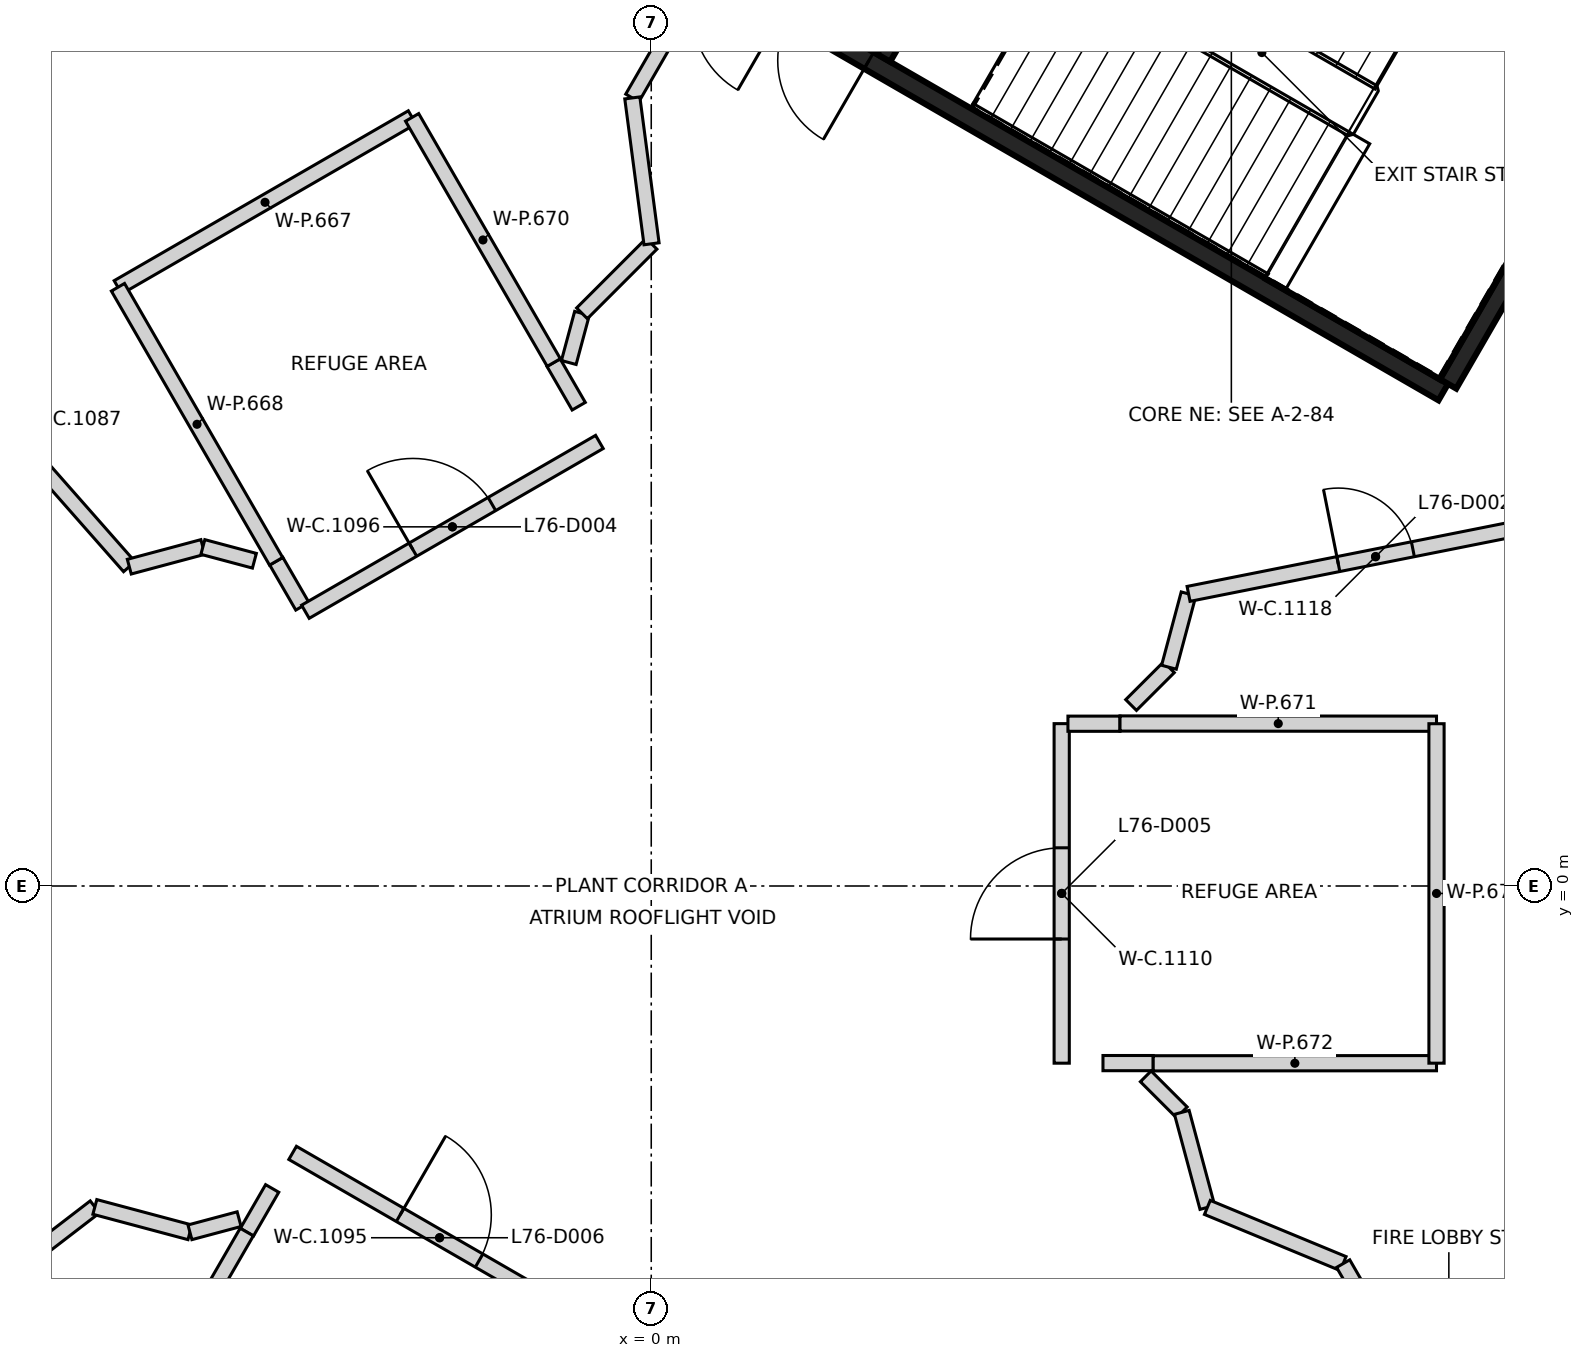
"""IFC4 building model, lengths in metres.
Left out: names, types, materials, properties, quantities, classifications, styles, units other than length and angle.
Written with IfcOpenShell. Run it as: python <this file> out.ifc"""

import sys

from ifc_helpers import new_model, si_unit, direction, frame, frame_2d, origin, origin_2d, place, context, subcontext, project, spatial, rectangle, extrude, element, fill, save


model = new_model("IFC4")
c1 = context("Model", 3, precision=1e-05, world=origin(), true_north=direction((0.0, 1.0)))
c2 = subcontext(c1, "Body", "Model", "MODEL_VIEW")
j1 = project(units=[si_unit("LENGTHUNIT", "METRE"), si_unit("PLANEANGLEUNIT", "RADIAN")], contexts=[c1])
p1 = place(None, origin())
s1 = spatial("IfcSite", under=j1, at=p1, CompositionType="ELEMENT")
p2 = place(p1, origin())
s2 = spatial("IfcBuilding", under=s1, at=p2, CompositionType="ELEMENT")
p3 = place(p2, frame((0.0, 0.0, 301.8)))
s3 = spatial("IfcBuildingStorey", under=s2, at=p3, CompositionType="ELEMENT", Elevation=301.8)
p4 = place(p3, frame((10.42, 6.498, 0.0), z_axis=(0.0, 0.0, 1.0), x_axis=(-0.866021906294, 0.500006057782, 0.0)))
e1 = element("IfcWall", 1, at=p4, inside=s3, PredefinedType="SHEAR", context=c2, shape_type="SweptSolid", body=[
    extrude(rectangle(XDim=11.55, YDim=0.25, at=frame_2d((5.775, 0.0))), origin(), (0.0, 0.0, 1.0), 4.45),
])
p5 = place(p4, frame((10.025, 0.0, 0.0)))
e2 = element("IfcOpeningElement", 2, at=p5, cuts=e1, PredefinedType="OPENING", context=c2, shape_type="SweptSolid", body=[
    extrude(rectangle(XDim=1.2, YDim=2.1, at=frame_2d((0.6, 1.05))), frame((0.0, 0.135, 0.0), z_axis=(0.0, -1.0, 0.0), x_axis=(1.0, 0.0, 0.0)), (0.0, 0.0, 1.0), 0.27),
])
p6 = place(p4, frame((8.725, 0.0, 0.0)))
e3 = element("IfcOpeningElement", 3, at=p6, cuts=e1, PredefinedType="OPENING", context=c2, shape_type="SweptSolid", body=[
    extrude(rectangle(XDim=1.2, YDim=2.1, at=frame_2d((0.6, 1.05))), frame((0.0, 0.135, 0.0), z_axis=(0.0, -1.0, 0.0), x_axis=(1.0, 0.0, 0.0)), (0.0, 0.0, 1.0), 0.27),
])
p7 = place(p3, frame((13.238, 11.378, 0.0), z_axis=(0.0, 0.0, 1.0), x_axis=(-0.500008851346, -0.866020293397, 0.0)))
e4 = element("IfcWall", 4, at=p7, inside=s3, PredefinedType="SHEAR", context=c2, shape_type="SweptSolid", body=[
    extrude(rectangle(XDim=5.51, YDim=0.25, at=frame_2d((2.755, 0.0))), origin(), (0.0, 0.0, 1.0), 4.45),
])
p8 = place(p3, frame((3.057, 10.895, 0.0), z_axis=(0.0, 0.0, 1.0), x_axis=(0.500027839223, 0.866009330205, 0.0)))
e5 = element("IfcWall", 5, at=p8, inside=s3, PredefinedType="SHEAR", context=c2, shape_type="SweptSolid", body=[
    extrude(rectangle(XDim=5.098, YDim=0.2, at=frame_2d((2.549, 0.0))), origin(), (0.0, 0.0, 1.0), 4.45),
])
p9 = place(p8, frame((1.774, 0.0, 0.0)))
e6 = element("IfcOpeningElement", 6, at=p9, cuts=e5, PredefinedType="OPENING", context=c2, shape_type="SweptSolid", body=[
    extrude(rectangle(XDim=1.4, YDim=2.1, at=frame_2d((0.7, 1.05))), frame((0.0, 0.11, 0.0), z_axis=(0.0, -1.0, 0.0), x_axis=(1.0, 0.0, 0.0)), (0.0, 0.0, 1.0), 0.22),
])
p10 = place(p3, frame((-9.802, 7.533, 0.0), z_axis=(0.0, 0.0, 1.0), x_axis=(0.660992214586, -0.750392758665, 0.0)))
e7 = element("IfcWall", 7, at=p10, inside=s3, PredefinedType="PARTITIONING", context=c2, shape_type="SweptSolid", body=[
    extrude(rectangle(XDim=4.44, YDim=0.2, at=frame_2d((2.22, 0.0))), origin(), (0.0, 0.0, 1.0), 4.45),
])
p11 = place(p3, frame((-8.854, -5.4, 0.0), z_axis=(0.0, 0.0, 1.0), x_axis=(0.793116457917, 0.609070015828, 0.0)))
e8 = element("IfcWall", 8, at=p11, inside=s3, PredefinedType="PARTITIONING", context=c2, shape_type="SweptSolid", body=[
    extrude(rectangle(XDim=1.934, YDim=0.2, at=frame_2d((0.967, 0.0))), origin(), (0.0, 0.0, 1.0), 4.45),
])
p12 = place(p3, frame((-6.867, 4.201, 0.0), z_axis=(0.0, 0.0, 1.0), x_axis=(0.966012174397, 0.258496574284, 0.0)))
e9 = element("IfcWall", 9, at=p12, inside=s3, PredefinedType="PARTITIONING", context=c2, shape_type="SweptSolid", body=[
    extrude(rectangle(XDim=1.002, YDim=0.2, at=frame_2d((0.501, 0.0))), origin(), (0.0, 0.0, 1.0), 4.45),
])
p13 = place(p3, frame((-7.32, -4.222, 0.0), z_axis=(0.0, 0.0, 1.0), x_axis=(0.966159789195, -0.257944299691, 0.0)))
e10 = element("IfcWall", 10, at=p13, inside=s3, PredefinedType="PARTITIONING", context=c2, shape_type="SweptSolid", body=[
    extrude(rectangle(XDim=1.295, YDim=0.2, at=frame_2d((0.647, 0.0))), origin(), (0.0, 0.0, 1.0), 4.45),
])
p14 = place(p3, frame((-6.069, -4.556, 0.0), z_axis=(0.0, 0.0, 1.0), x_axis=(0.966113813523, 0.258116445273, 0.0)))
e11 = element("IfcWall", 11, at=p14, inside=s3, PredefinedType="PARTITIONING", context=c2, shape_type="SweptSolid", body=[
    extrude(rectangle(XDim=0.67, YDim=0.2, at=frame_2d((0.335, 0.0))), origin(), (0.0, 0.0, 1.0), 4.45),
])
p15 = place(p3, frame((-5.899, 4.46, 0.0), z_axis=(0.0, 0.0, 1.0), x_axis=(0.966194504605, -0.257814234034, 0.0)))
e12 = element("IfcWall", 12, at=p15, inside=s3, PredefinedType="PARTITIONING", context=c2, shape_type="SweptSolid", body=[
    extrude(rectangle(XDim=0.702, YDim=0.2, at=frame_2d((0.351, 0.0))), origin(), (0.0, 0.0, 1.0), 4.45),
])
p16 = place(p3, frame((-5.319, -4.554, 0.0), z_axis=(0.0, 0.0, 1.0), x_axis=(0.500093796661, 0.865971243484, 0.0)))
e13 = element("IfcWall", 13, at=p16, inside=s3, PredefinedType="PARTITIONING", context=c2, shape_type="SweptSolid", body=[
    extrude(rectangle(XDim=0.664, YDim=0.2, at=frame_2d((0.332, 0.0))), origin(), (0.0, 0.0, 1.0), 4.45),
])
p17 = place(p3, frame((-4.933, 4.273, 0.0), z_axis=(0.0, 0.0, 1.0), x_axis=(0.500699086314, -0.865621409719, 0.0)))
e14 = element("IfcWall", 14, at=p17, inside=s3, PredefinedType="PARTITIONING", context=c2, shape_type="SweptSolid", body=[
    extrude(rectangle(XDim=0.685, YDim=0.2, at=frame_2d((0.343, 0.0))), origin(), (0.0, 0.0, 1.0), 4.45),
])
p18 = place(p3, frame((-4.718, -3.511, 0.0), z_axis=(0.0, 0.0, 1.0), x_axis=(0.865993462583, -0.500055319703, 0.0)))
e15 = element("IfcWall", 15, at=p18, inside=s3, PredefinedType="PARTITIONING", context=c2, shape_type="SweptSolid", body=[
    extrude(rectangle(XDim=4.465, YDim=0.2, at=frame_2d((2.233, 0.0))), origin(), (0.0, 0.0, 1.0), 4.45),
])
p19 = place(p18, frame((1.633, 0.0, 0.0)))
e16 = element("IfcOpeningElement", 16, at=p19, cuts=e15, PredefinedType="OPENING", context=c2, shape_type="SweptSolid", body=[
    extrude(rectangle(XDim=1.2, YDim=2.1, at=frame_2d((0.6, 1.05))), frame((0.0, 0.11, 0.0), z_axis=(0.0, -1.0, 0.0), x_axis=(1.0, 0.0, 0.0)), (0.0, 0.0, 1.0), 0.22),
])
p20 = place(p3, frame((-4.55, 3.608, 0.0), z_axis=(0.0, 0.0, 1.0), x_axis=(0.865943452446, 0.500141917025, 0.0)))
e17 = element("IfcWall", 17, at=p20, inside=s3, PredefinedType="PARTITIONING", context=c2, shape_type="SweptSolid", body=[
    extrude(rectangle(XDim=4.467, YDim=0.2, at=frame_2d((2.233, 0.0))), origin(), (0.0, 0.0, 1.0), 4.45),
])
p21 = place(p20, frame((1.634, 0.0, 0.0)))
e18 = element("IfcOpeningElement", 18, at=p21, cuts=e17, PredefinedType="OPENING", context=c2, shape_type="SweptSolid", body=[
    extrude(rectangle(XDim=1.2, YDim=2.1, at=frame_2d((0.6, 1.05))), frame((0.0, 0.11, 0.0), z_axis=(0.0, -1.0, 0.0), x_axis=(1.0, 0.0, 0.0)), (0.0, 0.0, 1.0), 0.22),
])
p22 = place(p3, frame((-1.285, 6.885, 0.0), z_axis=(0.0, 0.0, 1.0), x_axis=(0.499988630717, -0.866031967744, 0.0)))
e19 = element("IfcWall", 19, at=p22, inside=s3, PredefinedType="PARTITIONING", context=c2, shape_type="SweptSolid", body=[
    extrude(rectangle(XDim=0.662, YDim=0.2, at=frame_2d((0.331, 0.0))), origin(), (0.0, 0.0, 1.0), 4.45),
])
p23 = place(p3, frame((-1.085, 6.887, 0.0), z_axis=(0.0, 0.0, 1.0), x_axis=(0.259816652695, 0.965657965836, 0.0)))
e20 = element("IfcWall", 20, at=p23, inside=s3, PredefinedType="PARTITIONING", context=c2, shape_type="SweptSolid", body=[
    extrude(rectangle(XDim=0.67, YDim=0.2, at=frame_2d((0.335, 0.0))), origin(), (0.0, 0.0, 1.0), 4.45),
])
p24 = place(p3, frame((-0.911, 7.534, 0.0), z_axis=(0.0, 0.0, 1.0), x_axis=(0.707012431094, 0.707201118692, 0.0)))
e21 = element("IfcWall", 21, at=p24, inside=s3, PredefinedType="PARTITIONING", context=c2, shape_type="SweptSolid", body=[
    extrude(rectangle(XDim=1.294, YDim=0.2, at=frame_2d((0.647, 0.0))), origin(), (0.0, 0.0, 1.0), 4.45),
])
p25 = place(p3, frame((-0.249, 10.368, 0.0), z_axis=(0.0, 0.0, 1.0), x_axis=(0.499965372359, 0.866045395139, 0.0)))
e22 = element("IfcWall", 22, at=p25, inside=s3, PredefinedType="PARTITIONING", context=c2, shape_type="SweptSolid", body=[
    extrude(rectangle(XDim=1.798, YDim=0.2, at=frame_2d((0.899, 0.0))), origin(), (0.0, 0.0, 1.0), 4.45),
])
p26 = place(p3, frame((-0.249, 10.368, 0.0), z_axis=(0.0, 0.0, 1.0), x_axis=(0.13067638415, -0.991425076658, 0.0)))
e23 = element("IfcWall", 23, at=p26, inside=s3, PredefinedType="PARTITIONING", context=c2, shape_type="SweptSolid", body=[
    extrude(rectangle(XDim=1.936, YDim=0.2, at=frame_2d((0.968, 0.0))), origin(), (0.0, 0.0, 1.0), 4.45),
])
p27 = place(p3, frame((5.4, -2.331, 0.0), z_axis=(0.0, 0.0, 1.0), x_axis=(0.0, 1.0, 0.0)))
e24 = element("IfcWall", 24, at=p27, inside=s3, PredefinedType="PARTITIONING", context=c2, shape_type="SweptSolid", body=[
    extrude(rectangle(XDim=4.467, YDim=0.2, at=frame_2d((2.233, 0.0))), origin(), (0.0, 0.0, 1.0), 4.45),
])
p28 = place(p27, frame((1.634, 0.0, 0.0)))
e25 = element("IfcOpeningElement", 25, at=p28, cuts=e24, PredefinedType="OPENING", context=c2, shape_type="SweptSolid", body=[
    extrude(rectangle(XDim=1.2, YDim=2.1, at=frame_2d((0.6, 1.05))), frame((0.0, 0.11, 0.0), z_axis=(0.0, -1.0, 0.0), x_axis=(1.0, 0.0, 0.0)), (0.0, 0.0, 1.0), 0.22),
])
p29 = place(p3, frame((5.482, 2.135, 0.0), z_axis=(0.0, 0.0, 1.0), x_axis=(1.0, 0.0, 0.0)))
e26 = element("IfcWall", 26, at=p29, inside=s3, PredefinedType="PARTITIONING", context=c2, shape_type="SweptSolid", body=[
    extrude(rectangle(XDim=0.685, YDim=0.2, at=frame_2d((0.343, 0.0))), origin(), (0.0, 0.0, 1.0), 4.45),
])
p30 = place(p3, frame((5.943, -2.33, 0.0), z_axis=(0.0, 0.0, 1.0), x_axis=(1.0, 0.0, 0.0)))
e27 = element("IfcWall", 27, at=p30, inside=s3, PredefinedType="PARTITIONING", context=c2, shape_type="SweptSolid", body=[
    extrude(rectangle(XDim=0.661, YDim=0.2, at=frame_2d((0.331, 0.0))), origin(), (0.0, 0.0, 1.0), 4.45),
])
p31 = place(p3, frame((6.313, 2.381, 0.0), z_axis=(0.0, 0.0, 1.0), x_axis=(0.707973863937, 0.706238633878, 0.0)))
e28 = element("IfcWall", 28, at=p31, inside=s3, PredefinedType="PARTITIONING", context=c2, shape_type="SweptSolid", body=[
    extrude(rectangle(XDim=0.703, YDim=0.2, at=frame_2d((0.352, 0.0))), origin(), (0.0, 0.0, 1.0), 4.45),
])
p32 = place(p3, frame((6.506, -2.504, 0.0), z_axis=(0.0, 0.0, 1.0), x_axis=(0.706924654529, -0.707288860946, 0.0)))
e29 = element("IfcWall", 29, at=p32, inside=s3, PredefinedType="PARTITIONING", context=c2, shape_type="SweptSolid", body=[
    extrude(rectangle(XDim=0.67, YDim=0.2, at=frame_2d((0.335, 0.0))), origin(), (0.0, 0.0, 1.0), 4.45),
])
p33 = place(p3, frame((6.811, 2.878, 0.0), z_axis=(0.0, 0.0, 1.0), x_axis=(0.258316655297, 0.966060301221, 0.0)))
e30 = element("IfcWall", 30, at=p33, inside=s3, PredefinedType="PARTITIONING", context=c2, shape_type="SweptSolid", body=[
    extrude(rectangle(XDim=0.999, YDim=0.2, at=frame_2d((0.5, 0.0))), origin(), (0.0, 0.0, 1.0), 4.45),
])
p34 = place(p3, frame((6.98, -2.978, 0.0), z_axis=(0.0, 0.0, 1.0), x_axis=(0.259797678908, -0.965663070659, 0.0)))
e31 = element("IfcWall", 31, at=p34, inside=s3, PredefinedType="PARTITIONING", context=c2, shape_type="SweptSolid", body=[
    extrude(rectangle(XDim=1.295, YDim=0.2, at=frame_2d((0.647, 0.0))), origin(), (0.0, 0.0, 1.0), 4.45),
])
p35 = place(p3, frame((7.316, -4.229, 0.0), z_axis=(0.0, 0.0, 1.0), x_axis=(0.923978372606, -0.382444724054, 0.0)))
e32 = element("IfcWall", 32, at=p35, inside=s3, PredefinedType="PARTITIONING", context=c2, shape_type="SweptSolid", body=[
    extrude(rectangle(XDim=1.934, YDim=0.2, at=frame_2d((0.967, 0.0))), origin(), (0.0, 0.0, 1.0), 4.45),
])
p36 = place(p3, frame((7.069, 3.843, 0.0), z_axis=(0.0, 0.0, 1.0), x_axis=(0.98077114194, 0.195161387415, 0.0)))
e33 = element("IfcWall", 33, at=p36, inside=s3, PredefinedType="PARTITIONING", context=c2, shape_type="SweptSolid", body=[
    extrude(rectangle(XDim=5.016, YDim=0.2, at=frame_2d((2.508, 0.0))), origin(), (0.0, 0.0, 1.0), 4.45),
])
p37 = place(p36, frame((2.009, 0.0, 0.0)))
e34 = element("IfcOpeningElement", 34, at=p37, cuts=e33, PredefinedType="OPENING", context=c2, shape_type="SweptSolid", body=[
    extrude(rectangle(XDim=1.0, YDim=2.1, at=frame_2d((0.5, 1.05))), frame((0.0, 0.11, 0.0), z_axis=(0.0, -1.0, 0.0), x_axis=(1.0, 0.0, 0.0)), (0.0, 0.0, 1.0), 0.22),
])
p38 = place(p3, frame((9.103, -4.968, 0.0), z_axis=(0.0, 0.0, 1.0), x_axis=(0.500008413725, -0.866020546064, 0.0)))
e35 = element("IfcWall", 35, at=p38, inside=s3, PredefinedType="PARTITIONING", context=c2, shape_type="SweptSolid", body=[
    extrude(rectangle(XDim=1.798, YDim=0.2, at=frame_2d((0.899, 0.0))), origin(), (0.0, 0.0, 1.0), 4.45),
])
p39 = place(p3, frame((-7.185, -7.782, 0.0), z_axis=(0.0, 0.0, 1.0), x_axis=(0.499794252385, 0.866144159642, 0.0)))
e36 = element("IfcWall", 36, at=p39, inside=s3, PredefinedType="PARTITIONING", context=c2, shape_type="SweptSolid", body=[
    extrude(rectangle(XDim=3.729, YDim=0.2, at=frame_2d((1.864, 0.0))), origin(), (0.0, 0.0, 1.0), 4.45),
])
p40 = place(p3, frame((-7.016, 7.877, 0.0), z_axis=(0.0, 0.0, 1.0), x_axis=(0.865958133649, 0.500116497196, 0.0)))
e37 = element("IfcWall", 37, at=p40, inside=s3, PredefinedType="PARTITIONING", context=c2, shape_type="SweptSolid", body=[
    extrude(rectangle(XDim=4.469, YDim=0.2, at=frame_2d((2.235, 0.0))), origin(), (0.0, 0.0, 1.0), 4.45),
])
p41 = place(p3, frame((-7.016, 7.877, 0.0), z_axis=(0.0, 0.0, 1.0), x_axis=(0.499810457605, -0.866134808485, 0.0)))
e38 = element("IfcWall", 38, at=p41, inside=s3, PredefinedType="PARTITIONING", context=c2, shape_type="SweptSolid", body=[
    extrude(rectangle(XDim=4.163, YDim=0.2, at=frame_2d((2.081, 0.0))), origin(), (0.0, 0.0, 1.0), 4.45),
])
p42 = place(p3, frame((-3.146, 10.112, 0.0), z_axis=(0.0, 0.0, 1.0), x_axis=(0.500248116606, -0.865882106197, 0.0)))
e39 = element("IfcWall", 39, at=p42, inside=s3, PredefinedType="PARTITIONING", context=c2, shape_type="SweptSolid", body=[
    extrude(rectangle(XDim=3.725, YDim=0.2, at=frame_2d((1.863, 0.0))), origin(), (0.0, 0.0, 1.0), 4.45),
])
p43 = place(p3, frame((6.167, 2.138, 0.0), z_axis=(0.0, 0.0, 1.0), x_axis=(0.999999752498, -0.000703564554, 0.0)))
e40 = element("IfcWall", 40, at=p43, inside=s3, PredefinedType="PARTITIONING", context=c2, shape_type="SweptSolid", body=[
    extrude(rectangle(XDim=4.164, YDim=0.2, at=frame_2d((2.082, 0.0))), origin(), (0.0, 0.0, 1.0), 4.45),
])
p44 = place(p3, frame((6.604, -2.333, 0.0), z_axis=(0.0, 0.0, 1.0), x_axis=(0.999999894873, 0.000458535259, 0.0)))
e41 = element("IfcWall", 41, at=p44, inside=s3, PredefinedType="PARTITIONING", context=c2, shape_type="SweptSolid", body=[
    extrude(rectangle(XDim=3.727, YDim=0.2, at=frame_2d((1.864, 0.0))), origin(), (0.0, 0.0, 1.0), 4.45),
])
p45 = place(p3, frame((10.331, -2.331, 0.0), z_axis=(0.0, 0.0, 1.0), x_axis=(0.0, 1.0, 0.0)))
e42 = element("IfcWall", 42, at=p45, inside=s3, PredefinedType="PARTITIONING", context=c2, shape_type="SweptSolid", body=[
    extrude(rectangle(XDim=4.466, YDim=0.2, at=frame_2d((2.233, 0.0))), origin(), (0.0, 0.0, 1.0), 4.45),
])
p46 = place(p3, frame((0.0, 0.0, -0.4)))
p47 = place(p46, origin())
p48 = place(p47, frame((0.0, 0.0, 0.35)))
e43 = element("IfcWindow", 43, at=p48, inside=s3, PartitioningType="SINGLE_PANEL", PredefinedType="SKYLIGHT", context=c2, shape_type="SweptSolid", body=[
    extrude(rectangle(XDim=4.88, YDim=3.04, at=origin_2d()), origin(), (0.0, 0.0, 1.0), 0.05),
])
p49 = place(p6, origin())
e44 = element("IfcDoor", 44, at=p49, inside=s3, OperationType="SINGLE_SWING_RIGHT", PredefinedType="DOOR", context=c2, shape_type="SweptSolid", body=[
    extrude(rectangle(XDim=1.2, YDim=2.1, at=frame_2d((0.6, 1.05))), frame((0.0, 0.025, 0.0), z_axis=(0.0, -1.0, 0.0), x_axis=(1.0, 0.0, 0.0)), (0.0, 0.0, 1.0), 0.05),
])
fill(e3, e44)
p50 = place(p37, frame((1.0, 0.0, 0.0), z_axis=(0.0, 0.0, 1.0), x_axis=(-1.0, 0.0, 0.0)))
e45 = element("IfcDoor", 45, at=p50, inside=s3, OperationType="SINGLE_SWING_LEFT", PredefinedType="DOOR", context=c2, shape_type="SweptSolid", body=[
    extrude(rectangle(XDim=1.0, YDim=2.1, at=frame_2d((0.5, 1.05))), frame((0.0, 0.025, 0.0), z_axis=(0.0, -1.0, 0.0), x_axis=(1.0, 0.0, 0.0)), (0.0, 0.0, 1.0), 0.05),
])
fill(e34, e45)
p51 = place(p21, origin())
e46 = element("IfcDoor", 46, at=p51, inside=s3, OperationType="SINGLE_SWING_LEFT", PredefinedType="DOOR", context=c2, shape_type="SweptSolid", body=[
    extrude(rectangle(XDim=1.2, YDim=2.1, at=frame_2d((0.6, 1.05))), frame((0.0, 0.025, 0.0), z_axis=(0.0, -1.0, 0.0), x_axis=(1.0, 0.0, 0.0)), (0.0, 0.0, 1.0), 0.05),
])
fill(e18, e46)
p52 = place(p28, frame((1.2, 0.0, 0.0), z_axis=(0.0, 0.0, 1.0), x_axis=(-1.0, 0.0, 0.0)))
e47 = element("IfcDoor", 47, at=p52, inside=s3, OperationType="SINGLE_SWING_LEFT", PredefinedType="DOOR", context=c2, shape_type="SweptSolid", body=[
    extrude(rectangle(XDim=1.2, YDim=2.1, at=frame_2d((0.6, 1.05))), frame((0.0, 0.025, 0.0), z_axis=(0.0, -1.0, 0.0), x_axis=(1.0, 0.0, 0.0)), (0.0, 0.0, 1.0), 0.05),
])
fill(e25, e47)
p53 = place(p19, frame((1.2, 0.0, 0.0), z_axis=(0.0, 0.0, 1.0), x_axis=(-1.0, 0.0, 0.0)))
e48 = element("IfcDoor", 48, at=p53, inside=s3, OperationType="SINGLE_SWING_LEFT", PredefinedType="DOOR", context=c2, shape_type="SweptSolid", body=[
    extrude(rectangle(XDim=1.2, YDim=2.1, at=frame_2d((0.6, 1.05))), frame((0.0, 0.025, 0.0), z_axis=(0.0, -1.0, 0.0), x_axis=(1.0, 0.0, 0.0)), (0.0, 0.0, 1.0), 0.05),
])
fill(e16, e48)
save(model, sys.argv[1])
